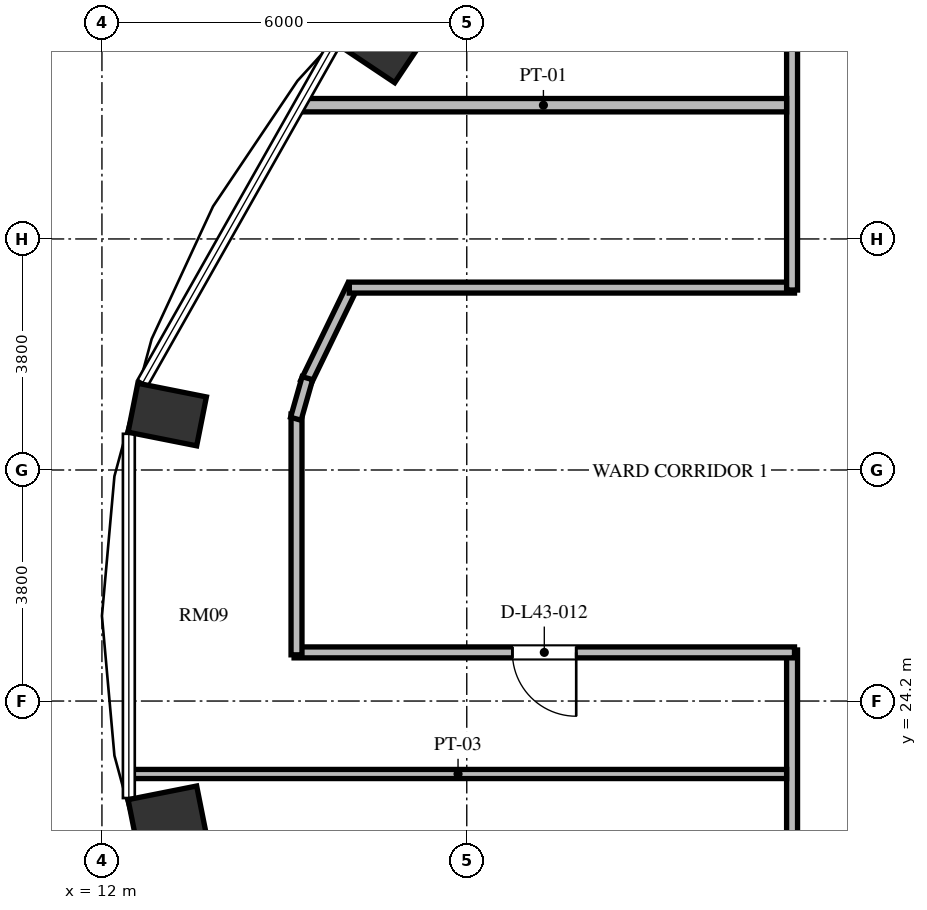
"""IFC4 building model, lengths in metres.
Left out: names, types, materials, properties, quantities, classifications, styles, units other than length and angle.
Written with IfcOpenShell. Run it as: python <this file> out.ifc"""

import sys

from ifc_helpers import new_model, si_unit, direction, frame, frame_2d, origin, origin_2d, place, context, subcontext, project, spatial, rectangle, extrude, element, fill, save


model = new_model("IFC4")
c1 = context("Model", 3, precision=1e-05, world=origin(), true_north=direction((0.0, 1.0)))
c2 = subcontext(c1, "Body", "Model", "MODEL_VIEW")
j1 = project(units=[si_unit("LENGTHUNIT", "METRE"), si_unit("PLANEANGLEUNIT", "RADIAN")], contexts=[c1])
p1 = place(None, origin())
s1 = spatial("IfcSite", under=j1, at=p1, CompositionType="ELEMENT")
p2 = place(p1, origin())
s2 = spatial("IfcBuilding", under=s1, at=p2, CompositionType="ELEMENT")
p3 = place(p2, frame((0.0, 0.0, 167.472)))
s3 = spatial("IfcBuildingStorey", under=s2, at=p3, CompositionType="ELEMENT", Elevation=167.472)
for number, where, z_axis, x_axis in (
    (1, (16.564, 35.031, 0.0), (0.0, 0.0, 1.0), (-0.831, 0.556, 0.0)),
    (2, (13.074, 28.912, 0.0), (0.0, 0.0, 1.0), (-0.981, 0.195, 0.0)),
    (3, (13.074, 22.288, 0.0), (0.0, 0.0, 1.0), (-0.981, -0.195, 0.0)),
):
    element("IfcColumn", number, at=place(p3, frame(where, z_axis=z_axis, x_axis=x_axis)), inside=s3, PredefinedType="COLUMN", context=c2, shape_type="SweptSolid", body=[
        extrude(rectangle(XDim=1.15, YDim=0.82, at=origin_2d()), origin(), (0.0, 0.0, 1.0), 3.648),
    ])
p4 = place(p3, frame((15.35, 29.436, 0.0), z_axis=(0.0, 0.0, 1.0), x_axis=(0.436196025907, 0.899851669434, 0.0)))
e4 = element("IfcWall", 4, at=p4, inside=s3, PredefinedType="PARTITIONING", context=c2, shape_type="SweptSolid", body=[
    extrude(rectangle(XDim=1.778, YDim=0.18, at=frame_2d((0.889, 0.0))), origin(), (0.0, 0.0, 1.0), 3.428),
])
p5 = place(p3, frame((16.068, 31.0, 0.0), z_axis=(0.0, 0.0, 1.0), x_axis=(1.0, 0.0, 0.0)))
e5 = element("IfcWall", 5, at=p5, inside=s3, PredefinedType="PARTITIONING", context=c2, shape_type="SweptSolid", body=[
    extrude(rectangle(XDim=7.322, YDim=0.18, at=frame_2d((3.661, 0.0))), origin(), (0.0, 0.0, 1.0), 3.428),
])
p6 = place(p3, frame((23.35, 30.96, 0.0), z_axis=(0.0, 0.0, 1.0), x_axis=(0.0, 1.0, 0.0)))
e6 = element("IfcWall", 6, at=p6, inside=s3, PredefinedType="PARTITIONING", context=c2, shape_type="SweptSolid", body=[
    extrude(rectangle(XDim=6.714, YDim=0.18, at=frame_2d((3.357, 0.0))), origin(), (0.0, 0.0, 1.0), 3.428),
])
p7 = place(p3, frame((23.35, 19.98, 0.0), z_axis=(0.0, 0.0, 1.0), x_axis=(0.0, 1.0, 0.0)))
e7 = element("IfcWall", 7, at=p7, inside=s3, PredefinedType="PARTITIONING", context=c2, shape_type="SweptSolid", body=[
    extrude(rectangle(XDim=5.06, YDim=0.18, at=frame_2d((2.53, 0.0))), origin(), (0.0, 0.0, 1.0), 3.428),
])
p8 = place(p3, frame((23.39, 25.0, 0.0), z_axis=(0.0, 0.0, 1.0), x_axis=(-1.0, 0.0, 0.0)))
e8 = element("IfcWall", 8, at=p8, inside=s3, PredefinedType="PARTITIONING", context=c2, shape_type="SweptSolid", body=[
    extrude(rectangle(XDim=8.23, YDim=0.18, at=frame_2d((4.115, 0.0))), origin(), (0.0, 0.0, 1.0), 3.428),
])
p9 = place(p8, frame((3.59, 0.0, 0.0)))
e9 = element("IfcOpeningElement", 9, at=p9, cuts=e8, PredefinedType="OPENING", context=c2, shape_type="SweptSolid", body=[
    extrude(rectangle(XDim=1.05, YDim=2.15, at=frame_2d((0.525, 1.075))), frame((0.0, 0.1, 0.0), z_axis=(0.0, -1.0, 0.0), x_axis=(1.0, 0.0, 0.0)), (0.0, 0.0, 1.0), 0.2),
])
p10 = place(p3, frame((15.2, 24.96, 0.0), z_axis=(0.0, 0.0, 1.0), x_axis=(0.0, 1.0, 0.0)))
e10 = element("IfcWall", 10, at=p10, inside=s3, PredefinedType="PARTITIONING", context=c2, shape_type="SweptSolid", body=[
    extrude(rectangle(XDim=3.961, YDim=0.18, at=frame_2d((1.98, 0.0))), origin(), (0.0, 0.0, 1.0), 3.428),
])
p11 = place(p3, frame((15.189, 28.843, 0.0), z_axis=(0.0, 0.0, 1.0), x_axis=(0.272862960331, 0.962052911684, 0.0)))
e11 = element("IfcWall", 11, at=p11, inside=s3, PredefinedType="PARTITIONING", context=c2, shape_type="SweptSolid", body=[
    extrude(rectangle(XDim=0.694, YDim=0.18, at=frame_2d((0.347, 0.0))), origin(), (0.0, 0.0, 1.0), 3.428),
])
p12 = place(p3, frame((12.453, 23.0, 0.0), z_axis=(0.0, 0.0, 1.0), x_axis=(1.0, 0.0, 0.0)))
e12 = element("IfcWall", 12, at=p12, inside=s3, PredefinedType="PARTITIONING", context=c2, shape_type="SweptSolid", body=[
    extrude(rectangle(XDim=10.807, YDim=0.15, at=frame_2d((5.404, 0.0))), origin(), (0.0, 0.0, 1.0), 3.428),
])
p13 = place(p3, frame((15.261, 34.0, 0.0), z_axis=(0.0, 0.0, 1.0), x_axis=(1.0, 0.0, 0.0)))
e13 = element("IfcWall", 13, at=p13, inside=s3, PredefinedType="PARTITIONING", context=c2, shape_type="SweptSolid", body=[
    extrude(rectangle(XDim=7.999, YDim=0.22, at=frame_2d((4.0, 0.0))), origin(), (0.0, 0.0, 1.0), 3.428),
])
p14 = place(p9, origin())
e14 = element("IfcDoor", 14, at=p14, inside=s3, OperationType="SINGLE_SWING_LEFT", PredefinedType="DOOR", context=c2, shape_type="SweptSolid", body=[
    extrude(rectangle(XDim=1.05, YDim=2.15, at=frame_2d((0.525, 1.075))), frame((0.0, 0.025, 0.0), z_axis=(0.0, -1.0, 0.0), x_axis=(1.0, 0.0, 0.0)), (0.0, 0.0, 1.0), 0.05),
])
fill(e9, e14)
save(model, sys.argv[1])
